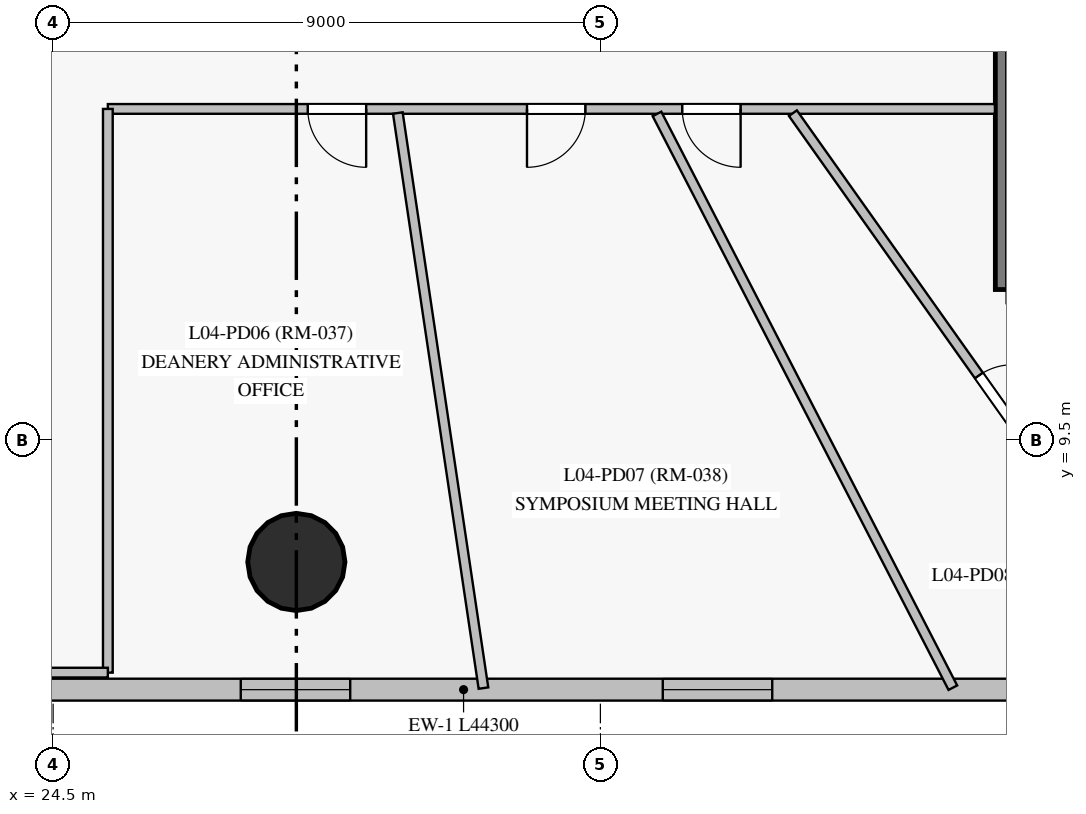
"""IFC4 building model, lengths in metres.
Left out: names, types, materials, properties, quantities, classifications, styles, units other than length and angle.
Written with IfcOpenShell. Run it as: python <this file> out.ifc"""

import sys

from ifc_helpers import new_model, si_unit, direction, frame, frame_2d, origin, origin_with_axes, origin_2d, place, context, subcontext, project, spatial, rectangle, circle, extrude, source, transform, mapped, element, fill, save


model = new_model("IFC4")
c1 = context("Model", 3, precision=1e-05, world=origin(), true_north=direction((0.0, 1.0)))
c2 = subcontext(c1, "Body", "Model", "MODEL_VIEW")
j1 = project(units=[si_unit("LENGTHUNIT", "METRE"), si_unit("PLANEANGLEUNIT", "RADIAN")], contexts=[c1])
p1 = place(None, origin())
s1 = spatial("IfcSite", under=j1, at=p1, CompositionType="ELEMENT")
p2 = place(p1, origin())
s2 = spatial("IfcBuilding", under=s1, at=p2, CompositionType="ELEMENT")
p3 = place(p2, frame((0.0, 0.0, 18.0)))
s3 = spatial("IfcBuildingStorey", under=s2, at=p3, CompositionType="ELEMENT", Elevation=18.0)
m1 = source(origin_with_axes(), c2, "Body", "SweptSolid", [
    extrude(circle(Radius=0.8, at=origin_2d()), origin(), (0.0, 0.0, 1.0), 4.5),
])
p4 = place(p3, frame((28.5, 7.5, 0.0), z_axis=(0.0, 0.0, 1.0), x_axis=(1.0, 0.0, 0.0)))
e1 = element("IfcColumn", 1, at=p4, inside=s3, PredefinedType="COLUMN", context=c2, shape_type="MappedRepresentation", body=[
    mapped(m1, transform((0.0, 0.0, 0.0), scale=1.0)),
])
p5 = place(p3, frame((9.1, 5.4, 0.0), z_axis=(0.0, 0.0, 1.0), x_axis=(1.0, 0.0, 0.0)))
e2 = element("IfcWall", 2, at=p5, inside=s3, PredefinedType="SOLIDWALL", context=c2, shape_type="SweptSolid", body=[
    extrude(rectangle(XDim=44.3, YDim=0.36, at=frame_2d((22.15, 0.0))), origin(), (0.0, 0.0, 1.0), 4.225),
])
p6 = place(p5, frame((0.934, 0.0, 0.85)))
e3 = element("IfcOpeningElement", 3, at=p6, cuts=e2, PredefinedType="OPENING", context=c2, shape_type="SweptSolid", body=[
    extrude(rectangle(XDim=1.8, YDim=2.2, at=frame_2d((0.9, 1.1))), frame((0.0, 0.19, 0.0), z_axis=(0.0, -1.0, 0.0), x_axis=(1.0, 0.0, 0.0)), (0.0, 0.0, 1.0), 0.38),
])
p7 = place(p5, frame((8.148, 0.0, 0.85)))
e4 = element("IfcOpeningElement", 4, at=p7, cuts=e2, PredefinedType="OPENING", context=c2, shape_type="SweptSolid", body=[
    extrude(rectangle(XDim=1.8, YDim=2.2, at=frame_2d((0.9, 1.1))), frame((0.0, 0.19, 0.0), z_axis=(0.0, -1.0, 0.0), x_axis=(1.0, 0.0, 0.0)), (0.0, 0.0, 1.0), 0.38),
])
p8 = place(p5, frame((13.3, 0.0, 0.85)))
e5 = element("IfcOpeningElement", 5, at=p8, cuts=e2, PredefinedType="OPENING", context=c2, shape_type="SweptSolid", body=[
    extrude(rectangle(XDim=1.8, YDim=2.2, at=frame_2d((0.9, 1.1))), frame((0.0, 0.19, 0.0), z_axis=(0.0, -1.0, 0.0), x_axis=(1.0, 0.0, 0.0)), (0.0, 0.0, 1.0), 0.38),
])
p9 = place(p5, frame((18.486, 0.0, 0.85)))
e6 = element("IfcOpeningElement", 6, at=p9, cuts=e2, PredefinedType="OPENING", context=c2, shape_type="SweptSolid", body=[
    extrude(rectangle(XDim=1.8, YDim=2.2, at=frame_2d((0.9, 1.1))), frame((0.0, 0.19, 0.0), z_axis=(0.0, -1.0, 0.0), x_axis=(1.0, 0.0, 0.0)), (0.0, 0.0, 1.0), 0.38),
])
p10 = place(p5, frame((25.426, 0.0, 0.85)))
e7 = element("IfcOpeningElement", 7, at=p10, cuts=e2, PredefinedType="OPENING", context=c2, shape_type="SweptSolid", body=[
    extrude(rectangle(XDim=1.8, YDim=2.2, at=frame_2d((0.9, 1.1))), frame((0.0, 0.19, 0.0), z_axis=(0.0, -1.0, 0.0), x_axis=(1.0, 0.0, 0.0)), (0.0, 0.0, 1.0), 0.38),
])
p11 = place(p5, frame((31.311, 0.0, 0.85)))
e8 = element("IfcOpeningElement", 8, at=p11, cuts=e2, PredefinedType="OPENING", context=c2, shape_type="SweptSolid", body=[
    extrude(rectangle(XDim=1.8, YDim=2.2, at=frame_2d((0.9, 1.1))), frame((0.0, 0.19, 0.0), z_axis=(0.0, -1.0, 0.0), x_axis=(1.0, 0.0, 0.0)), (0.0, 0.0, 1.0), 0.38),
])
p12 = place(p5, frame((37.481, 0.0, 0.85)))
e9 = element("IfcOpeningElement", 9, at=p12, cuts=e2, PredefinedType="OPENING", context=c2, shape_type="SweptSolid", body=[
    extrude(rectangle(XDim=1.8, YDim=2.2, at=frame_2d((0.9, 1.1))), frame((0.0, 0.19, 0.0), z_axis=(0.0, -1.0, 0.0), x_axis=(1.0, 0.0, 0.0)), (0.0, 0.0, 1.0), 0.38),
])
p13 = place(p5, frame((41.271, 0.0, 0.85)))
e10 = element("IfcOpeningElement", 10, at=p13, cuts=e2, PredefinedType="OPENING", context=c2, shape_type="SweptSolid", body=[
    extrude(rectangle(XDim=1.8, YDim=2.2, at=frame_2d((0.9, 1.1))), frame((0.0, 0.19, 0.0), z_axis=(0.0, -1.0, 0.0), x_axis=(1.0, 0.0, 0.0)), (0.0, 0.0, 1.0), 0.38),
])
p14 = place(p3, frame((40.095, 11.98, 0.0), z_axis=(0.0, 0.0, 1.0), x_axis=(0.0, 1.0, 0.0)))
e11 = element("IfcWall", 11, at=p14, inside=s3, PredefinedType="SHEAR", context=c2, shape_type="SweptSolid", body=[
    extrude(rectangle(XDim=7.35, YDim=0.2, at=frame_2d((3.675, 0.0))), origin(), (0.0, 0.0, 1.0), 4.225),
])
p15 = place(p3, frame((39.988, 14.95, 0.0), z_axis=(0.0, 0.0, 1.0), x_axis=(-1.0, 0.0, 0.0)))
e12 = element("IfcWall", 12, at=p15, inside=s3, PredefinedType="PARTITIONING", context=c2, shape_type="SweptSolid", body=[
    extrude(rectangle(XDim=14.588, YDim=0.16, at=frame_2d((7.294, 0.0))), origin(), (0.0, 0.0, 1.0), 2.825),
])
p16 = place(p15, frame((10.34, 0.0, 0.0)))
e13 = element("IfcOpeningElement", 13, at=p16, cuts=e12, PredefinedType="OPENING", context=c2, shape_type="SweptSolid", body=[
    extrude(rectangle(XDim=0.96, YDim=2.15, at=frame_2d((0.48, 1.075))), frame((0.0, 0.09, 0.0), z_axis=(0.0, -1.0, 0.0), x_axis=(1.0, 0.0, 0.0)), (0.0, 0.0, 1.0), 0.18),
])
p17 = place(p15, frame((6.735, 0.0, 0.0)))
e14 = element("IfcOpeningElement", 14, at=p17, cuts=e12, PredefinedType="OPENING", context=c2, shape_type="SweptSolid", body=[
    extrude(rectangle(XDim=0.96, YDim=2.15, at=frame_2d((0.48, 1.075))), frame((0.0, 0.09, 0.0), z_axis=(0.0, -1.0, 0.0), x_axis=(1.0, 0.0, 0.0)), (0.0, 0.0, 1.0), 0.18),
])
p18 = place(p15, frame((4.182, 0.0, 0.0)))
e15 = element("IfcOpeningElement", 15, at=p18, cuts=e12, PredefinedType="OPENING", context=c2, shape_type="SweptSolid", body=[
    extrude(rectangle(XDim=0.96, YDim=2.15, at=frame_2d((0.48, 1.075))), frame((0.0, 0.09, 0.0), z_axis=(0.0, -1.0, 0.0), x_axis=(1.0, 0.0, 0.0)), (0.0, 0.0, 1.0), 0.18),
])
p19 = place(p3, frame((36.666, 14.88, 0.0), z_axis=(0.0, 0.0, 1.0), x_axis=(0.578443831224, -0.815722216272, 0.0)))
e16 = element("IfcWall", 16, at=p19, inside=s3, PredefinedType="PARTITIONING", context=c2, shape_type="SweptSolid", body=[
    extrude(rectangle(XDim=11.576, YDim=0.16, at=frame_2d((5.788, 0.0))), origin(), (0.0, 0.0, 1.0), 4.225),
])
p20 = place(p19, frame((5.288, 0.0, 0.0)))
e17 = element("IfcOpeningElement", 17, at=p20, cuts=e16, PredefinedType="OPENING", context=c2, shape_type="SweptSolid", body=[
    extrude(rectangle(XDim=0.96, YDim=2.15, at=frame_2d((0.48, 1.075))), frame((0.0, 0.09, 0.0), z_axis=(0.0, -1.0, 0.0), x_axis=(1.0, 0.0, 0.0)), (0.0, 0.0, 1.0), 0.18),
])
p21 = place(p3, frame((34.431, 14.868, 0.0), z_axis=(0.0, 0.0, 1.0), x_axis=(0.458318369651, -0.888788091752, 0.0)))
e18 = element("IfcWall", 18, at=p21, inside=s3, PredefinedType="PARTITIONING", context=c2, shape_type="SweptSolid", body=[
    extrude(rectangle(XDim=10.616, YDim=0.16, at=frame_2d((5.308, 0.0))), origin(), (0.0, 0.0, 1.0), 4.225),
])
p22 = place(p3, frame((30.169, 14.883, 0.0), z_axis=(0.0, 0.0, 1.0), x_axis=(0.147252839934, -0.989098883394, 0.0)))
e19 = element("IfcWall", 19, at=p22, inside=s3, PredefinedType="PARTITIONING", context=c2, shape_type="SweptSolid", body=[
    extrude(rectangle(XDim=9.562, YDim=0.16, at=frame_2d((4.781, 0.0))), origin(), (0.0, 0.0, 1.0), 4.225),
])
p23 = place(p3, frame((25.4, 14.95, 0.0), z_axis=(0.0, 0.0, 1.0), x_axis=(0.0, -1.0, 0.0)))
e20 = element("IfcWall", 20, at=p23, inside=s3, PredefinedType="PARTITIONING", context=c2, shape_type="SweptSolid", body=[
    extrude(rectangle(XDim=9.27, YDim=0.16, at=frame_2d((4.635, 0.0))), origin(), (0.0, 0.0, 1.0), 4.225),
])
p24 = place(p3, frame((25.4, 5.68, 0.0), z_axis=(0.0, 0.0, 1.0), x_axis=(-1.0, 0.0, 0.0)))
e21 = element("IfcWall", 21, at=p24, inside=s3, PredefinedType="PARTITIONING", context=c2, shape_type="SweptSolid", body=[
    extrude(rectangle(XDim=4.2, YDim=0.16, at=frame_2d((2.1, 0.0))), origin(), (0.0, 0.0, 1.0), 4.225),
])
m2 = source(origin_with_axes(), c2, "Body", "SweptSolid", [
    extrude(rectangle(XDim=1.8, YDim=2.2, at=frame_2d((0.9, 1.1))), frame((0.0, 0.03, 0.0), z_axis=(0.0, -1.0, 0.0), x_axis=(1.0, 0.0, 0.0)), (0.0, 0.0, 1.0), 0.06),
])
p25 = place(p9, origin())
e22 = element("IfcWindow", 22, at=p25, inside=s3, PartitioningType="SINGLE_PANEL", PredefinedType="WINDOW", context=c2, shape_type="MappedRepresentation", body=[
    mapped(m2, transform((0.0, 0.0, 0.0), scale=1.0)),
])
fill(e6, e22)
p26 = place(p10, origin())
e23 = element("IfcWindow", 23, at=p26, inside=s3, PartitioningType="SINGLE_PANEL", PredefinedType="WINDOW", context=c2, shape_type="MappedRepresentation", body=[
    mapped(m2, transform((0.0, 0.0, 0.0), scale=1.0)),
])
fill(e7, e23)
m3 = source(origin_with_axes(), c2, "Body", "SweptSolid", [
    extrude(rectangle(XDim=0.96, YDim=2.15, at=frame_2d((0.48, 1.075))), frame((0.0, 0.025, 0.0), z_axis=(0.0, -1.0, 0.0), x_axis=(1.0, 0.0, 0.0)), (0.0, 0.0, 1.0), 0.05),
])
p27 = place(p16, origin())
e24 = element("IfcDoor", 24, at=p27, inside=s3, OperationType="SINGLE_SWING_LEFT", PredefinedType="DOOR", context=c2, shape_type="MappedRepresentation", body=[
    mapped(m3, transform((0.0, 0.0, 0.0), scale=1.0)),
])
fill(e13, e24)
p28 = place(p17, origin())
e25 = element("IfcDoor", 25, at=p28, inside=s3, OperationType="SINGLE_SWING_RIGHT", PredefinedType="DOOR", context=c2, shape_type="MappedRepresentation", body=[
    mapped(m3, transform((0.0, 0.0, 0.0), scale=1.0)),
])
fill(e14, e25)
p29 = place(p18, origin())
e26 = element("IfcDoor", 26, at=p29, inside=s3, OperationType="SINGLE_SWING_LEFT", PredefinedType="DOOR", context=c2, shape_type="MappedRepresentation", body=[
    mapped(m3, transform((0.0, 0.0, 0.0), scale=1.0)),
])
fill(e15, e26)
p30 = place(p20, origin())
e27 = element("IfcDoor", 27, at=p30, inside=s3, OperationType="SINGLE_SWING_RIGHT", PredefinedType="DOOR", context=c2, shape_type="MappedRepresentation", body=[
    mapped(m3, transform((0.0, 0.0, 0.0), scale=1.0)),
])
fill(e17, e27)
save(model, sys.argv[1])
